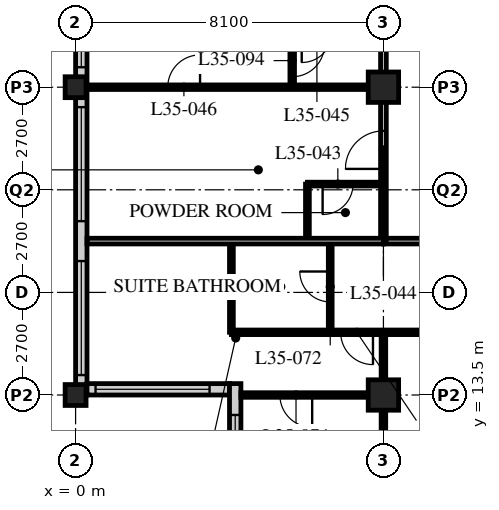
"""IFC4 building model, lengths in metres.
Left out: names, types, materials, properties, quantities, classifications, styles, units other than length and angle.
Written with IfcOpenShell. Run it as: python <this file> out.ifc"""

import sys

from ifc_helpers import new_model, si_unit, direction, frame, frame_2d, origin, origin_2d, place, context, subcontext, project, spatial, rectangle, hollow_rectangle, extrude, element, fill, save


model = new_model("IFC4")
c1 = context("Model", 3, precision=1e-05, world=origin(), true_north=direction((0.0, 1.0)))
c2 = subcontext(c1, "Body", "Model", "MODEL_VIEW")
j1 = project(units=[si_unit("LENGTHUNIT", "METRE"), si_unit("PLANEANGLEUNIT", "RADIAN")], contexts=[c1])
p1 = place(None, origin())
s1 = spatial("IfcSite", under=j1, at=p1, CompositionType="ELEMENT")
p2 = place(p1, origin())
s2 = spatial("IfcBuilding", under=s1, at=p2, CompositionType="ELEMENT")
p3 = place(p2, frame((0.0, 0.0, 137.4)))
s3 = spatial("IfcBuildingStorey", under=s2, at=p3, CompositionType="ELEMENT", Elevation=137.4)
for number, where, z_axis, x_axis in (
    (1, (0.0, 13.5, 0.0), (0.0, 0.0, 1.0), (1.0, 0.0, 0.0)),
    (2, (0.0, 21.6, 0.0), (0.0, 0.0, 1.0), (1.0, 0.0, 0.0)),
):
    element("IfcColumn", number, at=place(p3, frame(where, z_axis=z_axis, x_axis=x_axis)), inside=s3, PredefinedType="COLUMN", context=c2, shape_type="SweptSolid", body=[
        extrude(hollow_rectangle(XDim=0.55, YDim=0.55, WallThickness=0.04, at=origin_2d()), origin(), (0.0, 0.0, 1.0), 3.4),
    ])
for number, where, z_axis, x_axis in (
    (3, (8.1, 13.5, 0.0), (0.0, 0.0, 1.0), (1.0, 0.0, 0.0)),
    (4, (8.1, 21.6, 0.0), (0.0, 0.0, 1.0), (1.0, 0.0, 0.0)),
):
    element("IfcColumn", number, at=place(p3, frame(where, z_axis=z_axis, x_axis=x_axis)), inside=s3, PredefinedType="COLUMN", context=c2, shape_type="SweptSolid", body=[
        extrude(hollow_rectangle(XDim=0.8, YDim=0.8, WallThickness=0.08, at=origin_2d()), origin(), (0.0, 0.0, 1.0), 3.4),
    ])
p4 = place(p3, frame((0.15, 45.6, 0.0), z_axis=(0.0, 0.0, 1.0), x_axis=(0.0, -1.0, 0.0)))
e5 = element("IfcWall", 5, at=p4, inside=s3, PredefinedType="SOLIDWALL", context=c2, shape_type="SweptSolid", body=[
    extrude(rectangle(XDim=32.1, YDim=0.3, at=frame_2d((16.05, 0.0))), origin(), (0.0, 0.0, 1.0), 3.19),
])
p5 = place(p4, frame((0.225, 0.0, 0.9)))
e6 = element("IfcOpeningElement", 6, at=p5, cuts=e5, PredefinedType="OPENING", context=c2, shape_type="SweptSolid", body=[
    extrude(rectangle(XDim=3.0, YDim=2.0, at=frame_2d((1.5, 1.0))), frame((0.0, 0.16, 0.0), z_axis=(0.0, -1.0, 0.0), x_axis=(1.0, 0.0, 0.0)), (0.0, 0.0, 1.0), 0.32),
])
p6 = place(p4, frame((4.275, 0.0, 0.9)))
e7 = element("IfcOpeningElement", 7, at=p6, cuts=e5, PredefinedType="OPENING", context=c2, shape_type="SweptSolid", body=[
    extrude(rectangle(XDim=3.0, YDim=2.0, at=frame_2d((1.5, 1.0))), frame((0.0, 0.16, 0.0), z_axis=(0.0, -1.0, 0.0), x_axis=(1.0, 0.0, 0.0)), (0.0, 0.0, 1.0), 0.32),
])
p7 = place(p4, frame((8.325, 0.0, 0.9)))
e8 = element("IfcOpeningElement", 8, at=p7, cuts=e5, PredefinedType="OPENING", context=c2, shape_type="SweptSolid", body=[
    extrude(rectangle(XDim=3.0, YDim=2.0, at=frame_2d((1.5, 1.0))), frame((0.0, 0.16, 0.0), z_axis=(0.0, -1.0, 0.0), x_axis=(1.0, 0.0, 0.0)), (0.0, 0.0, 1.0), 0.32),
])
p8 = place(p4, frame((12.375, 0.0, 0.9)))
e9 = element("IfcOpeningElement", 9, at=p8, cuts=e5, PredefinedType="OPENING", context=c2, shape_type="SweptSolid", body=[
    extrude(rectangle(XDim=3.0, YDim=2.0, at=frame_2d((1.5, 1.0))), frame((0.0, 0.16, 0.0), z_axis=(0.0, -1.0, 0.0), x_axis=(1.0, 0.0, 0.0)), (0.0, 0.0, 1.0), 0.32),
])
p9 = place(p4, frame((16.425, 0.0, 0.9)))
e10 = element("IfcOpeningElement", 10, at=p9, cuts=e5, PredefinedType="OPENING", context=c2, shape_type="SweptSolid", body=[
    extrude(rectangle(XDim=3.0, YDim=2.0, at=frame_2d((1.5, 1.0))), frame((0.0, 0.16, 0.0), z_axis=(0.0, -1.0, 0.0), x_axis=(1.0, 0.0, 0.0)), (0.0, 0.0, 1.0), 0.32),
])
p10 = place(p4, frame((20.475, 0.0, 0.9)))
e11 = element("IfcOpeningElement", 11, at=p10, cuts=e5, PredefinedType="OPENING", context=c2, shape_type="SweptSolid", body=[
    extrude(rectangle(XDim=3.0, YDim=2.0, at=frame_2d((1.5, 1.0))), frame((0.0, 0.16, 0.0), z_axis=(0.0, -1.0, 0.0), x_axis=(1.0, 0.0, 0.0)), (0.0, 0.0, 1.0), 0.32),
])
p11 = place(p4, frame((24.525, 0.0, 0.9)))
e12 = element("IfcOpeningElement", 12, at=p11, cuts=e5, PredefinedType="OPENING", context=c2, shape_type="SweptSolid", body=[
    extrude(rectangle(XDim=3.0, YDim=2.0, at=frame_2d((1.5, 1.0))), frame((0.0, 0.16, 0.0), z_axis=(0.0, -1.0, 0.0), x_axis=(1.0, 0.0, 0.0)), (0.0, 0.0, 1.0), 0.32),
])
p12 = place(p4, frame((28.575, 0.0, 0.9)))
e13 = element("IfcOpeningElement", 13, at=p12, cuts=e5, PredefinedType="OPENING", context=c2, shape_type="SweptSolid", body=[
    extrude(rectangle(XDim=3.0, YDim=2.0, at=frame_2d((1.5, 1.0))), frame((0.0, 0.16, 0.0), z_axis=(0.0, -1.0, 0.0), x_axis=(1.0, 0.0, 0.0)), (0.0, 0.0, 1.0), 0.32),
])
p13 = place(p3, frame((0.3, 13.65, 0.0), z_axis=(0.0, 0.0, 1.0), x_axis=(1.0, 0.0, 0.0)))
e14 = element("IfcWall", 14, at=p13, inside=s3, PredefinedType="SOLIDWALL", context=c2, shape_type="SweptSolid", body=[
    extrude(rectangle(XDim=3.75, YDim=0.3, at=frame_2d((1.875, 0.0))), origin(), (0.0, 0.0, 1.0), 3.19),
])
p14 = place(p13, frame((0.225, 0.0, 0.9)))
e15 = element("IfcOpeningElement", 15, at=p14, cuts=e14, PredefinedType="OPENING", context=c2, shape_type="SweptSolid", body=[
    extrude(rectangle(XDim=3.0, YDim=1.5, at=frame_2d((1.5, 0.75))), frame((0.0, 0.16, 0.0), z_axis=(0.0, -1.0, 0.0), x_axis=(1.0, 0.0, 0.0)), (0.0, 0.0, 1.0), 0.32),
])
p15 = place(p3, frame((4.2, 13.8, 0.0), z_axis=(0.0, 0.0, 1.0), x_axis=(0.0, -1.0, 0.0)))
e16 = element("IfcWall", 16, at=p15, inside=s3, PredefinedType="SOLIDWALL", context=c2, shape_type="SweptSolid", body=[
    extrude(rectangle(XDim=4.35, YDim=0.3, at=frame_2d((2.175, 0.0))), origin(), (0.0, 0.0, 1.0), 3.19),
])
p16 = place(p15, frame((0.825, 0.0, 0.9)))
e17 = element("IfcOpeningElement", 17, at=p16, cuts=e16, PredefinedType="OPENING", context=c2, shape_type="SweptSolid", body=[
    extrude(rectangle(XDim=3.0, YDim=1.5, at=frame_2d((1.5, 0.75))), frame((0.0, 0.16, 0.0), z_axis=(0.0, -1.0, 0.0), x_axis=(1.0, 0.0, 0.0)), (0.0, 0.0, 1.0), 0.32),
])
p17 = place(p3, frame((8.1, 17.55, 0.0), z_axis=(0.0, 0.0, 1.0), x_axis=(1.0, 0.0, 0.0)))
e18 = element("IfcWall", 18, at=p17, inside=s3, PredefinedType="PARTITIONING", context=c2, shape_type="SweptSolid", body=[
    extrude(rectangle(XDim=36.45, YDim=0.15, at=frame_2d((18.225, 0.0))), origin(), (0.0, 0.0, 1.0), 3.19),
])
p18 = place(p17, frame((9.625, 0.0, 0.0)))
e19 = element("IfcOpeningElement", 19, at=p18, cuts=e18, PredefinedType="OPENING", context=c2, shape_type="SweptSolid", body=[
    extrude(rectangle(XDim=1.0, YDim=2.1, at=frame_2d((0.5, 1.05))), frame((0.0, 0.085, 0.0), z_axis=(0.0, -1.0, 0.0), x_axis=(1.0, 0.0, 0.0)), (0.0, 0.0, 1.0), 0.17),
])
p19 = place(p17, frame((18.1, 0.0, 0.0)))
e20 = element("IfcOpeningElement", 20, at=p19, cuts=e18, PredefinedType="OPENING", context=c2, shape_type="SweptSolid", body=[
    extrude(rectangle(XDim=1.0, YDim=2.1, at=frame_2d((0.5, 1.05))), frame((0.0, 0.085, 0.0), z_axis=(0.0, -1.0, 0.0), x_axis=(1.0, 0.0, 0.0)), (0.0, 0.0, 1.0), 0.17),
])
p20 = place(p17, frame((26.75, 0.0, 0.0)))
e21 = element("IfcOpeningElement", 21, at=p20, cuts=e18, PredefinedType="OPENING", context=c2, shape_type="SweptSolid", body=[
    extrude(rectangle(XDim=1.0, YDim=2.1, at=frame_2d((0.5, 1.05))), frame((0.0, 0.085, 0.0), z_axis=(0.0, -1.0, 0.0), x_axis=(1.0, 0.0, 0.0)), (0.0, 0.0, 1.0), 0.17),
])
p21 = place(p17, frame((30.8, 0.0, 0.0)))
e22 = element("IfcOpeningElement", 22, at=p21, cuts=e18, PredefinedType="OPENING", context=c2, shape_type="SweptSolid", body=[
    extrude(rectangle(XDim=1.0, YDim=2.1, at=frame_2d((0.5, 1.05))), frame((0.0, 0.085, 0.0), z_axis=(0.0, -1.0, 0.0), x_axis=(1.0, 0.0, 0.0)), (0.0, 0.0, 1.0), 0.17),
])
p22 = place(p17, frame((1.525, 0.0, 0.0)))
e23 = element("IfcOpeningElement", 23, at=p22, cuts=e18, PredefinedType="OPENING", context=c2, shape_type="SweptSolid", body=[
    extrude(rectangle(XDim=1.0, YDim=2.1, at=frame_2d((0.5, 1.05))), frame((0.0, 0.085, 0.0), z_axis=(0.0, -1.0, 0.0), x_axis=(1.0, 0.0, 0.0)), (0.0, 0.0, 1.0), 0.17),
])
p23 = place(p17, frame((33.925, 0.0, 0.0)))
e24 = element("IfcOpeningElement", 24, at=p23, cuts=e18, PredefinedType="OPENING", context=c2, shape_type="SweptSolid", body=[
    extrude(rectangle(XDim=1.0, YDim=2.1, at=frame_2d((0.5, 1.05))), frame((0.0, 0.085, 0.0), z_axis=(0.0, -1.0, 0.0), x_axis=(1.0, 0.0, 0.0)), (0.0, 0.0, 1.0), 0.17),
])
p24 = place(p3, frame((8.1, 17.55, 0.0), z_axis=(0.0, 0.0, 1.0), x_axis=(0.0, 1.0, 0.0)))
e25 = element("IfcWall", 25, at=p24, inside=s3, PredefinedType="PARTITIONING", context=c2, shape_type="SweptSolid", body=[
    extrude(rectangle(XDim=28.35, YDim=0.15, at=frame_2d((14.175, 0.0))), origin(), (0.0, 0.0, 1.0), 2.578),
])
p25 = place(p24, frame((1.9, 0.0, 0.0)))
e26 = element("IfcOpeningElement", 26, at=p25, cuts=e25, PredefinedType="OPENING", context=c2, shape_type="SweptSolid", body=[
    extrude(rectangle(XDim=1.0, YDim=2.1, at=frame_2d((0.5, 1.05))), frame((0.0, 0.085, 0.0), z_axis=(0.0, -1.0, 0.0), x_axis=(1.0, 0.0, 0.0)), (0.0, 0.0, 1.0), 0.17),
])
p26 = place(p24, frame((10.0, 0.0, 0.0)))
e27 = element("IfcOpeningElement", 27, at=p26, cuts=e25, PredefinedType="OPENING", context=c2, shape_type="SweptSolid", body=[
    extrude(rectangle(XDim=1.0, YDim=2.1, at=frame_2d((0.5, 1.05))), frame((0.0, 0.085, 0.0), z_axis=(0.0, -1.0, 0.0), x_axis=(1.0, 0.0, 0.0)), (0.0, 0.0, 1.0), 0.17),
])
p27 = place(p24, frame((18.1, 0.0, 0.0)))
e28 = element("IfcOpeningElement", 28, at=p27, cuts=e25, PredefinedType="OPENING", context=c2, shape_type="SweptSolid", body=[
    extrude(rectangle(XDim=1.0, YDim=2.1, at=frame_2d((0.5, 1.05))), frame((0.0, 0.085, 0.0), z_axis=(0.0, -1.0, 0.0), x_axis=(1.0, 0.0, 0.0)), (0.0, 0.0, 1.0), 0.17),
])
p28 = place(p24, frame((24.9, 0.0, 0.0)))
e29 = element("IfcOpeningElement", 29, at=p28, cuts=e25, PredefinedType="OPENING", context=c2, shape_type="SweptSolid", body=[
    extrude(rectangle(XDim=1.0, YDim=2.1, at=frame_2d((0.5, 1.05))), frame((0.0, 0.085, 0.0), z_axis=(0.0, -1.0, 0.0), x_axis=(1.0, 0.0, 0.0)), (0.0, 0.0, 1.0), 0.17),
])
p29 = place(p3, frame((6.1, 17.55, 0.0), z_axis=(0.0, 0.0, 1.0), x_axis=(0.0, 1.0, 0.0)))
e30 = element("IfcWall", 30, at=p29, inside=s3, PredefinedType="PARTITIONING", context=c2, shape_type="SweptSolid", body=[
    extrude(rectangle(XDim=1.5, YDim=0.1, at=frame_2d((0.75, 0.0))), origin(), (0.0, 0.0, 1.0), 3.19),
])
p30 = place(p3, frame((8.1, 19.05, 0.0), z_axis=(0.0, 0.0, 1.0), x_axis=(-1.0, 0.0, 0.0)))
e31 = element("IfcWall", 31, at=p30, inside=s3, PredefinedType="PARTITIONING", context=c2, shape_type="SweptSolid", body=[
    extrude(rectangle(XDim=2.0, YDim=0.1, at=frame_2d((1.0, 0.0))), origin(), (0.0, 0.0, 1.0), 3.19),
])
p31 = place(p30, frame((0.8, 0.0, 0.0)))
e32 = element("IfcOpeningElement", 32, at=p31, cuts=e31, PredefinedType="OPENING", context=c2, shape_type="SweptSolid", body=[
    extrude(rectangle(XDim=0.8, YDim=2.1, at=frame_2d((0.4, 1.05))), frame((0.0, 0.06, 0.0), z_axis=(0.0, -1.0, 0.0), x_axis=(1.0, 0.0, 0.0)), (0.0, 0.0, 1.0), 0.12),
])
p32 = place(p3, frame((8.1, 21.6, 0.0), z_axis=(0.0, 0.0, 1.0), x_axis=(-1.0, 0.0, 0.0)))
e33 = element("IfcWall", 33, at=p32, inside=s3, PredefinedType="PARTITIONING", context=c2, shape_type="SweptSolid", body=[
    extrude(rectangle(XDim=7.8, YDim=0.12, at=frame_2d((3.9, 0.0))), origin(), (0.0, 0.0, 1.0), 2.578),
])
p33 = place(p32, frame((4.825, 0.0, 0.0)))
e34 = element("IfcOpeningElement", 34, at=p33, cuts=e33, PredefinedType="OPENING", context=c2, shape_type="SweptSolid", body=[
    extrude(rectangle(XDim=0.85, YDim=2.1, at=frame_2d((0.425, 1.05))), frame((0.0, 0.07, 0.0), z_axis=(0.0, -1.0, 0.0), x_axis=(1.0, 0.0, 0.0)), (0.0, 0.0, 1.0), 0.14),
])
p34 = place(p3, frame((6.7, 17.55, 0.0), z_axis=(0.0, 0.0, 1.0), x_axis=(0.0, -1.0, 0.0)))
e35 = element("IfcWall", 35, at=p34, inside=s3, PredefinedType="PARTITIONING", context=c2, shape_type="SweptSolid", body=[
    extrude(rectangle(XDim=2.4, YDim=0.1, at=frame_2d((1.2, 0.0))), origin(), (0.0, 0.0, 1.0), 3.19),
])
p35 = place(p34, frame((0.8, 0.0, 0.0)))
e36 = element("IfcOpeningElement", 36, at=p35, cuts=e35, PredefinedType="OPENING", context=c2, shape_type="SweptSolid", body=[
    extrude(rectangle(XDim=0.8, YDim=2.1, at=frame_2d((0.4, 1.05))), frame((0.0, 0.06, 0.0), z_axis=(0.0, -1.0, 0.0), x_axis=(1.0, 0.0, 0.0)), (0.0, 0.0, 1.0), 0.12),
])
p36 = place(p3, frame((4.1, 17.55, 0.0), z_axis=(0.0, 0.0, 1.0), x_axis=(0.0, -1.0, 0.0)))
e37 = element("IfcWall", 37, at=p36, inside=s3, PredefinedType="PARTITIONING", context=c2, shape_type="SweptSolid", body=[
    extrude(rectangle(XDim=2.4, YDim=0.1, at=frame_2d((1.2, 0.0))), origin(), (0.0, 0.0, 1.0), 3.19),
])
p37 = place(p3, frame((4.1, 15.15, 0.0), z_axis=(0.0, 0.0, 1.0), x_axis=(1.0, 0.0, 0.0)))
e38 = element("IfcWall", 38, at=p37, inside=s3, PredefinedType="PARTITIONING", context=c2, shape_type="SweptSolid", body=[
    extrude(rectangle(XDim=8.05, YDim=0.12, at=frame_2d((4.025, 0.0))), origin(), (0.0, 0.0, 1.0), 3.19),
])
p38 = place(p37, frame((6.725, 0.0, 0.0)))
e39 = element("IfcOpeningElement", 39, at=p38, cuts=e38, PredefinedType="OPENING", context=c2, shape_type="SweptSolid", body=[
    extrude(rectangle(XDim=0.85, YDim=2.1, at=frame_2d((0.425, 1.05))), frame((0.0, 0.07, 0.0), z_axis=(0.0, -1.0, 0.0), x_axis=(1.0, 0.0, 0.0)), (0.0, 0.0, 1.0), 0.14),
])
p39 = place(p37, frame((2.875, 0.0, 0.0)))
e40 = element("IfcOpeningElement", 40, at=p39, cuts=e38, PredefinedType="OPENING", context=c2, shape_type="SweptSolid", body=[
    extrude(rectangle(XDim=0.85, YDim=2.1, at=frame_2d((0.425, 1.05))), frame((0.0, 0.07, 0.0), z_axis=(0.0, -1.0, 0.0), x_axis=(1.0, 0.0, 0.0)), (0.0, 0.0, 1.0), 0.14),
])
p40 = place(p3, frame((8.1, 15.15, 0.0), z_axis=(0.0, 0.0, 1.0), x_axis=(0.0, -1.0, 0.0)))
e41 = element("IfcWall", 41, at=p40, inside=s3, PredefinedType="PARTITIONING", context=c2, shape_type="SweptSolid", body=[
    extrude(rectangle(XDim=5.4, YDim=0.12, at=frame_2d((2.7, 0.0))), origin(), (0.0, 0.0, 1.0), 2.578),
])
p41 = place(p3, frame((8.1, 13.5, 0.0), z_axis=(0.0, 0.0, 1.0), x_axis=(-1.0, 0.0, 0.0)))
e42 = element("IfcWall", 42, at=p41, inside=s3, PredefinedType="PARTITIONING", context=c2, shape_type="SweptSolid", body=[
    extrude(rectangle(XDim=3.75, YDim=0.12, at=frame_2d((1.875, 0.0))), origin(), (0.0, 0.0, 1.0), 2.578),
])
p42 = place(p41, frame((1.875, 0.0, 0.0)))
e43 = element("IfcOpeningElement", 43, at=p42, cuts=e42, PredefinedType="OPENING", context=c2, shape_type="SweptSolid", body=[
    extrude(rectangle(XDim=0.85, YDim=2.1, at=frame_2d((0.425, 1.05))), frame((0.0, 0.07, 0.0), z_axis=(0.0, -1.0, 0.0), x_axis=(1.0, 0.0, 0.0)), (0.0, 0.0, 1.0), 0.14),
])
p43 = place(p3, frame((0.3, 17.55, 0.0), z_axis=(0.0, 0.0, 1.0), x_axis=(1.0, 0.0, 0.0)))
e44 = element("IfcWall", 44, at=p43, inside=s3, PredefinedType="PARTITIONING", context=c2, shape_type="SweptSolid", body=[
    extrude(rectangle(XDim=7.8, YDim=0.15, at=frame_2d((3.9, 0.0))), origin(), (0.0, 0.0, 1.0), 3.19),
])
p44 = place(p3, frame((5.7, 21.6, 0.0), z_axis=(0.0, 0.0, 1.0), x_axis=(0.0, 1.0, 0.0)))
e45 = element("IfcWall", 45, at=p44, inside=s3, PredefinedType="PARTITIONING", context=c2, shape_type="SweptSolid", body=[
    extrude(rectangle(XDim=1.46, YDim=0.12, at=frame_2d((0.73, 0.0))), origin(), (0.0, 0.0, 1.0), 3.19),
])
p45 = place(p44, frame((0.275, 0.0, 0.0)))
e46 = element("IfcOpeningElement", 46, at=p45, cuts=e45, PredefinedType="OPENING", context=c2, shape_type="SweptSolid", body=[
    extrude(rectangle(XDim=0.85, YDim=2.1, at=frame_2d((0.425, 1.05))), frame((0.0, 0.07, 0.0), z_axis=(0.0, -1.0, 0.0), x_axis=(1.0, 0.0, 0.0)), (0.0, 0.0, 1.0), 0.14),
])
p46 = place(p10, origin())
e47 = element("IfcWindow", 47, at=p46, inside=s3, PartitioningType="SINGLE_PANEL", PredefinedType="WINDOW", context=c2, shape_type="SweptSolid", body=[
    extrude(rectangle(XDim=3.0, YDim=2.0, at=frame_2d((1.5, 1.0))), frame((0.0, 0.03, 0.0), z_axis=(0.0, -1.0, 0.0), x_axis=(1.0, 0.0, 0.0)), (0.0, 0.0, 1.0), 0.06),
])
fill(e11, e47)
p47 = place(p11, origin())
e48 = element("IfcWindow", 48, at=p47, inside=s3, PartitioningType="SINGLE_PANEL", PredefinedType="WINDOW", context=c2, shape_type="SweptSolid", body=[
    extrude(rectangle(XDim=3.0, YDim=2.0, at=frame_2d((1.5, 1.0))), frame((0.0, 0.03, 0.0), z_axis=(0.0, -1.0, 0.0), x_axis=(1.0, 0.0, 0.0)), (0.0, 0.0, 1.0), 0.06),
])
fill(e12, e48)
p48 = place(p12, origin())
e49 = element("IfcWindow", 49, at=p48, inside=s3, PartitioningType="SINGLE_PANEL", PredefinedType="WINDOW", context=c2, shape_type="SweptSolid", body=[
    extrude(rectangle(XDim=3.0, YDim=2.0, at=frame_2d((1.5, 1.0))), frame((0.0, 0.03, 0.0), z_axis=(0.0, -1.0, 0.0), x_axis=(1.0, 0.0, 0.0)), (0.0, 0.0, 1.0), 0.06),
])
fill(e13, e49)
p49 = place(p14, origin())
e50 = element("IfcWindow", 50, at=p49, inside=s3, PartitioningType="SINGLE_PANEL", PredefinedType="WINDOW", context=c2, shape_type="SweptSolid", body=[
    extrude(rectangle(XDim=3.0, YDim=1.5, at=frame_2d((1.5, 0.75))), frame((0.0, 0.03, 0.0), z_axis=(0.0, -1.0, 0.0), x_axis=(1.0, 0.0, 0.0)), (0.0, 0.0, 1.0), 0.06),
])
fill(e15, e50)
p50 = place(p16, origin())
e51 = element("IfcWindow", 51, at=p50, inside=s3, PartitioningType="SINGLE_PANEL", PredefinedType="WINDOW", context=c2, shape_type="SweptSolid", body=[
    extrude(rectangle(XDim=3.0, YDim=1.5, at=frame_2d((1.5, 0.75))), frame((0.0, 0.03, 0.0), z_axis=(0.0, -1.0, 0.0), x_axis=(1.0, 0.0, 0.0)), (0.0, 0.0, 1.0), 0.06),
])
fill(e17, e51)
p51 = place(p31, origin())
e52 = element("IfcDoor", 52, at=p51, inside=s3, OperationType="SINGLE_SWING_RIGHT", PredefinedType="DOOR", context=c2, shape_type="SweptSolid", body=[
    extrude(rectangle(XDim=0.8, YDim=2.1, at=frame_2d((0.4, 1.05))), frame((0.0, 0.025, 0.0), z_axis=(0.0, -1.0, 0.0), x_axis=(1.0, 0.0, 0.0)), (0.0, 0.0, 1.0), 0.05),
])
fill(e32, e52)
p52 = place(p25, origin())
e53 = element("IfcDoor", 53, at=p52, inside=s3, OperationType="SINGLE_SWING_LEFT", PredefinedType="DOOR", context=c2, shape_type="SweptSolid", body=[
    extrude(rectangle(XDim=1.0, YDim=2.1, at=frame_2d((0.5, 1.05))), frame((0.0, 0.025, 0.0), z_axis=(0.0, -1.0, 0.0), x_axis=(1.0, 0.0, 0.0)), (0.0, 0.0, 1.0), 0.05),
])
fill(e26, e53)
p53 = place(p33, origin())
e54 = element("IfcDoor", 54, at=p53, inside=s3, OperationType="SINGLE_SWING_RIGHT", PredefinedType="DOOR", context=c2, shape_type="SweptSolid", body=[
    extrude(rectangle(XDim=0.85, YDim=2.1, at=frame_2d((0.425, 1.05))), frame((0.0, 0.025, 0.0), z_axis=(0.0, -1.0, 0.0), x_axis=(1.0, 0.0, 0.0)), (0.0, 0.0, 1.0), 0.05),
])
fill(e34, e54)
p54 = place(p35, origin())
e55 = element("IfcDoor", 55, at=p54, inside=s3, OperationType="SINGLE_SWING_RIGHT", PredefinedType="DOOR", context=c2, shape_type="SweptSolid", body=[
    extrude(rectangle(XDim=0.8, YDim=2.1, at=frame_2d((0.4, 1.05))), frame((0.0, 0.025, 0.0), z_axis=(0.0, -1.0, 0.0), x_axis=(1.0, 0.0, 0.0)), (0.0, 0.0, 1.0), 0.05),
])
fill(e36, e55)
p55 = place(p39, origin())
e56 = element("IfcDoor", 56, at=p55, inside=s3, OperationType="SINGLE_SWING_LEFT", PredefinedType="DOOR", context=c2, shape_type="SweptSolid", body=[
    extrude(rectangle(XDim=0.85, YDim=2.1, at=frame_2d((0.425, 1.05))), frame((0.0, 0.025, 0.0), z_axis=(0.0, -1.0, 0.0), x_axis=(1.0, 0.0, 0.0)), (0.0, 0.0, 1.0), 0.05),
])
fill(e40, e56)
p56 = place(p42, origin())
e57 = element("IfcDoor", 57, at=p56, inside=s3, OperationType="SINGLE_SWING_LEFT", PredefinedType="DOOR", context=c2, shape_type="SweptSolid", body=[
    extrude(rectangle(XDim=0.85, YDim=2.1, at=frame_2d((0.425, 1.05))), frame((0.0, 0.025, 0.0), z_axis=(0.0, -1.0, 0.0), x_axis=(1.0, 0.0, 0.0)), (0.0, 0.0, 1.0), 0.05),
])
fill(e43, e57)
p57 = place(p45, origin())
e58 = element("IfcDoor", 58, at=p57, inside=s3, OperationType="SINGLE_SWING_LEFT", PredefinedType="DOOR", context=c2, shape_type="SweptSolid", body=[
    extrude(rectangle(XDim=0.85, YDim=2.1, at=frame_2d((0.425, 1.05))), frame((0.0, 0.025, 0.0), z_axis=(0.0, -1.0, 0.0), x_axis=(1.0, 0.0, 0.0)), (0.0, 0.0, 1.0), 0.05),
])
fill(e46, e58)
save(model, sys.argv[1])
